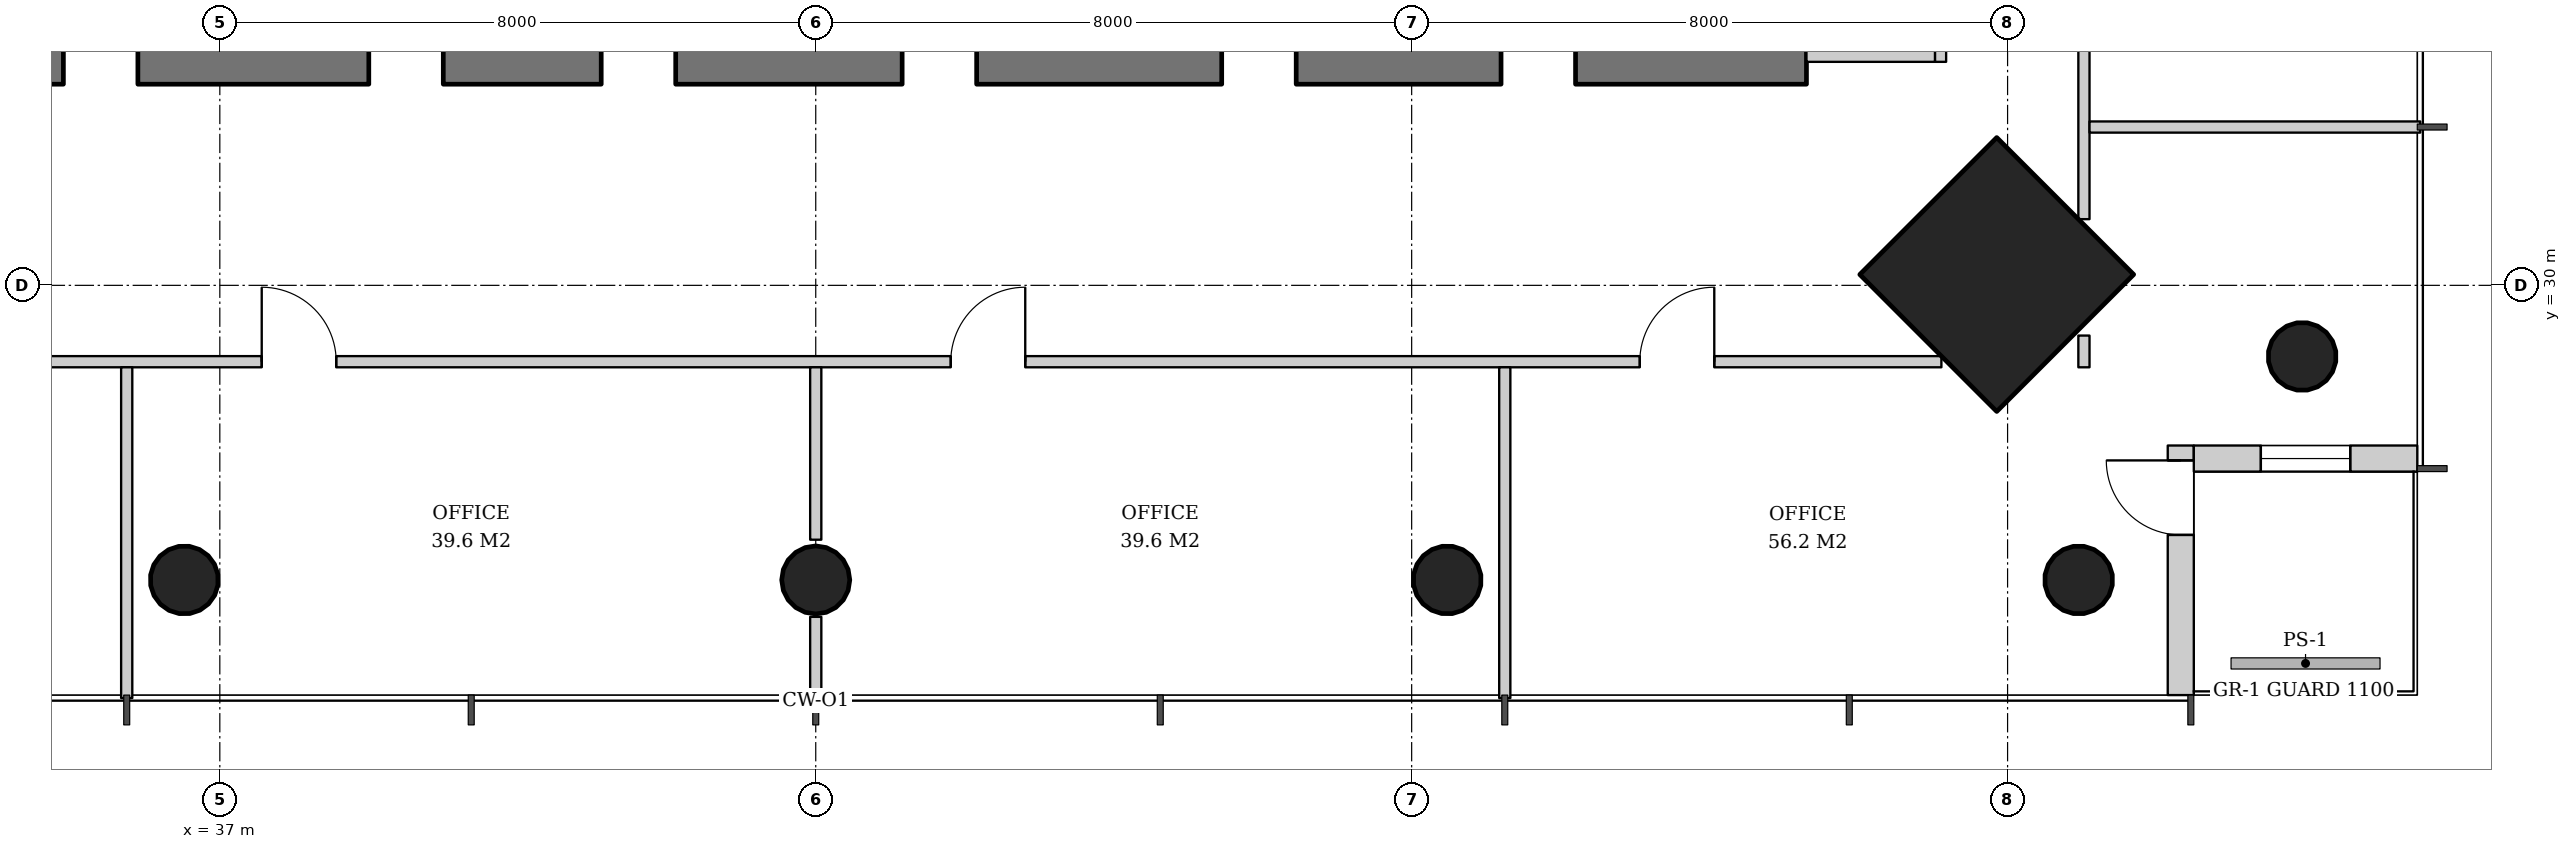
"""IFC4 building model, lengths in metres.
Left out: names, types, materials, properties, quantities, classifications, styles, units other than length and angle.
Written with IfcOpenShell. Run it as: python <this file> out.ifc"""

import sys

from ifc_helpers import new_model, si_unit, direction, frame, frame_2d, origin, origin_2d, place, context, subcontext, project, spatial, rectangle, hollow_circle, extrude, element, fill, save


model = new_model("IFC4")
c1 = context("Model", 3, precision=1e-05, world=origin(), true_north=direction((0.0, 1.0)))
c2 = subcontext(c1, "Body", "Model", "MODEL_VIEW")
j1 = project(units=[si_unit("LENGTHUNIT", "METRE"), si_unit("PLANEANGLEUNIT", "RADIAN")], contexts=[c1])
p1 = place(None, origin())
s1 = spatial("IfcSite", under=j1, at=p1, CompositionType="ELEMENT")
p2 = place(p1, origin())
s2 = spatial("IfcBuilding", under=s1, at=p2, CompositionType="ELEMENT")
p3 = place(p2, frame((0.0, 0.0, 146.4)))
s3 = spatial("IfcBuildingStorey", under=s2, at=p3, CompositionType="ELEMENT", Elevation=146.4)
p4 = place(p3, frame((64.993, 29.007, 0.0), z_axis=(-0.031962158256, 0.031962158256, 0.998977898093), x_axis=(-0.707106781187, -0.707106781187, 0.0)))
e1 = element("IfcColumn", 1, at=p4, inside=s3, PredefinedType="COLUMN", context=c2, shape_type="SweptSolid", body=[
    extrude(hollow_circle(Radius=0.457, WallThickness=0.03, at=origin_2d()), origin(), (0.0, 0.0, 1.0), 3.804),
])
p5 = place(p3, frame((60.893, 30.107, 0.0), z_axis=(-0.031898107953, 0.031898107953, 0.998981992539), x_axis=(-0.707106781187, -0.707106781187, 0.0)))
e2 = element("IfcColumn", 2, at=p5, inside=s3, PredefinedType="COLUMN", context=c2, shape_type="SweptSolid", body=[
    extrude(rectangle(XDim=2.6, YDim=2.6, at=origin_2d()), origin(), (0.0, 0.0, 1.0), 3.804),
])
p6 = place(p3, frame((61.993, 26.007, 0.0), z_axis=(-0.031962158256, 0.031962158256, 0.998977898093), x_axis=(-0.707106781187, -0.707106781187, 0.0)))
e3 = element("IfcColumn", 3, at=p6, inside=s3, PredefinedType="COLUMN", context=c2, shape_type="SweptSolid", body=[
    extrude(hollow_circle(Radius=0.457, WallThickness=0.03, at=origin_2d()), origin(), (0.0, 0.0, 1.0), 3.804),
])
p7 = place(p3, frame((36.504, 26.007, 0.0), z_axis=(0.015923015547, 0.031974442509, 0.999361842679), x_axis=(-0.895145027055, 0.445775033553, 0.0)))
e4 = element("IfcColumn", 4, at=p7, inside=s3, PredefinedType="COLUMN", context=c2, shape_type="SweptSolid", body=[
    extrude(hollow_circle(Radius=0.457, WallThickness=0.03, at=origin_2d()), origin(), (0.0, 0.0, 1.0), 3.802),
])
p8 = place(p3, frame((45.0, 26.007, 0.0), z_axis=(0.0, 0.031978496719, 0.999488557087), x_axis=(-1.0, 0.0, 0.0)))
e5 = element("IfcColumn", 5, at=p8, inside=s3, PredefinedType="COLUMN", context=c2, shape_type="SweptSolid", body=[
    extrude(hollow_circle(Radius=0.457, WallThickness=0.03, at=origin_2d()), origin(), (0.0, 0.0, 1.0), 3.802),
])
p9 = place(p3, frame((53.496, 26.007, 0.0), z_axis=(-0.015923015547, 0.031974442509, 0.999361842679), x_axis=(-0.895145027055, -0.445775033553, 0.0)))
e6 = element("IfcColumn", 6, at=p9, inside=s3, PredefinedType="COLUMN", context=c2, shape_type="SweptSolid", body=[
    extrude(hollow_circle(Radius=0.457, WallThickness=0.03, at=origin_2d()), origin(), (0.0, 0.0, 1.0), 3.802),
])
p10 = place(p3, frame((31.7, 33.05, 0.0), z_axis=(0.0, 0.0, 1.0), x_axis=(1.0, 0.0, 0.0)))
e7 = element("IfcWall", 7, at=p10, inside=s3, PredefinedType="SHEAR", context=c2, shape_type="SweptSolid", body=[
    extrude(rectangle(XDim=26.6, YDim=0.7, at=frame_2d((13.3, 0.0))), origin(), (0.0, 0.0, 1.0), 3.8),
])
p11 = place(p10, frame((7.3, 0.0, 0.0)))
e8 = element("IfcOpeningElement", 8, at=p11, cuts=e7, PredefinedType="OPENING", context=c2, shape_type="SweptSolid", body=[
    extrude(rectangle(XDim=1.0, YDim=2.1, at=frame_2d((0.5, 1.05))), frame((0.0, 0.36, 0.0), z_axis=(0.0, -1.0, 0.0), x_axis=(1.0, 0.0, 0.0)), (0.0, 0.0, 1.0), 0.72),
])
p12 = place(p10, frame((18.75, 0.0, 0.0)))
e9 = element("IfcOpeningElement", 9, at=p12, cuts=e7, PredefinedType="OPENING", context=c2, shape_type="SweptSolid", body=[
    extrude(rectangle(XDim=1.0, YDim=2.1, at=frame_2d((0.5, 1.05))), frame((0.0, 0.36, 0.0), z_axis=(0.0, -1.0, 0.0), x_axis=(1.0, 0.0, 0.0)), (0.0, 0.0, 1.0), 0.72),
])
p13 = place(p10, frame((3.2, 0.0, 0.0)))
e10 = element("IfcOpeningElement", 10, at=p13, cuts=e7, PredefinedType="OPENING", context=c2, shape_type="SweptSolid", body=[
    extrude(rectangle(XDim=1.0, YDim=2.1, at=frame_2d((0.5, 1.05))), frame((0.0, 0.36, 0.0), z_axis=(0.0, -1.0, 0.0), x_axis=(1.0, 0.0, 0.0)), (0.0, 0.0, 1.0), 0.72),
])
p14 = place(p10, frame((10.42, 0.0, 0.0)))
e11 = element("IfcOpeningElement", 11, at=p14, cuts=e7, PredefinedType="OPENING", context=c2, shape_type="SweptSolid", body=[
    extrude(rectangle(XDim=1.0, YDim=2.1, at=frame_2d((0.5, 1.05))), frame((0.0, 0.36, 0.0), z_axis=(0.0, -1.0, 0.0), x_axis=(1.0, 0.0, 0.0)), (0.0, 0.0, 1.0), 0.72),
])
p15 = place(p10, frame((14.46, 0.0, 0.0)))
e12 = element("IfcOpeningElement", 12, at=p15, cuts=e7, PredefinedType="OPENING", context=c2, shape_type="SweptSolid", body=[
    extrude(rectangle(XDim=1.0, YDim=2.1, at=frame_2d((0.5, 1.05))), frame((0.0, 0.36, 0.0), z_axis=(0.0, -1.0, 0.0), x_axis=(1.0, 0.0, 0.0)), (0.0, 0.0, 1.0), 0.72),
])
p16 = place(p10, frame((22.5, 0.0, 0.0)))
e13 = element("IfcOpeningElement", 13, at=p16, cuts=e7, PredefinedType="OPENING", context=c2, shape_type="SweptSolid", body=[
    extrude(rectangle(XDim=1.0, YDim=2.1, at=frame_2d((0.5, 1.05))), frame((0.0, 0.36, 0.0), z_axis=(0.0, -1.0, 0.0), x_axis=(1.0, 0.0, 0.0)), (0.0, 0.0, 1.0), 0.72),
])
p17 = place(p3, frame((63.325, 24.5, 0.0), z_axis=(0.0, 0.0, 1.0), x_axis=(0.0, 1.0, 0.0)))
e14 = element("IfcWall", 14, at=p17, inside=s3, PredefinedType="SOLIDWALL", context=c2, shape_type="SweptSolid", body=[
    extrude(rectangle(XDim=3.35, YDim=0.35, at=frame_2d((1.675, 0.0))), origin(), (0.0, 0.0, 1.0), 3.62),
])
p18 = place(p17, frame((2.15, 0.0, 0.0)))
e15 = element("IfcOpeningElement", 15, at=p18, cuts=e14, PredefinedType="OPENING", context=c2, shape_type="SweptSolid", body=[
    extrude(rectangle(XDim=1.0, YDim=2.4, at=frame_2d((0.5, 1.2))), frame((0.0, 0.185, 0.0), z_axis=(0.0, -1.0, 0.0), x_axis=(1.0, 0.0, 0.0)), (0.0, 0.0, 1.0), 0.37),
])
p19 = place(p3, frame((63.5, 27.675, 0.0), z_axis=(0.0, 0.0, 1.0), x_axis=(1.0, 0.0, 0.0)))
e16 = element("IfcWall", 16, at=p19, inside=s3, PredefinedType="SOLIDWALL", context=c2, shape_type="SweptSolid", body=[
    extrude(rectangle(XDim=3.0, YDim=0.35, at=frame_2d((1.5, 0.0))), origin(), (0.0, 0.0, 1.0), 3.62),
])
p20 = place(p19, frame((0.9, 0.0, 0.6)))
e17 = element("IfcOpeningElement", 17, at=p20, cuts=e16, PredefinedType="OPENING", context=c2, shape_type="SweptSolid", body=[
    extrude(rectangle(XDim=1.2, YDim=2.55, at=frame_2d((0.6, 1.275))), frame((0.0, 0.185, 0.0), z_axis=(0.0, -1.0, 0.0), x_axis=(1.0, 0.0, 0.0)), (0.0, 0.0, 1.0), 0.37),
])
p21 = place(p3, frame((60.1, 33.0, 0.0), z_axis=(0.0, 0.0, 1.0), x_axis=(0.0, 1.0, 0.0)))
e18 = element("IfcWall", 18, at=p21, inside=s3, PredefinedType="PARTITIONING", context=c2, shape_type="SweptSolid", body=[
    extrude(rectangle(XDim=10.975, YDim=0.15, at=frame_2d((5.488, 0.0))), origin(), (0.0, 0.0, 1.0), 2.72),
])
p22 = place(p21, frame((4.988, 0.0, 0.0)))
e19 = element("IfcOpeningElement", 19, at=p22, cuts=e18, PredefinedType="OPENING", context=c2, shape_type="SweptSolid", body=[
    extrude(rectangle(XDim=1.0, YDim=2.1, at=frame_2d((0.5, 1.05))), frame((0.0, 0.085, 0.0), z_axis=(0.0, -1.0, 0.0), x_axis=(1.0, 0.0, 0.0)), (0.0, 0.0, 1.0), 0.17),
])
p23 = place(p3, frame((58.3, 33.075, 0.0), z_axis=(0.0, 0.0, 1.0), x_axis=(1.0, 0.0, 0.0)))
e20 = element("IfcWall", 20, at=p23, inside=s3, PredefinedType="PARTITIONING", context=c2, shape_type="SweptSolid", body=[
    extrude(rectangle(XDim=1.725, YDim=0.15, at=frame_2d((0.862, 0.0))), origin(), (0.0, 0.0, 1.0), 2.72),
])
p24 = place(p3, frame((62.025, 28.9, 0.0), z_axis=(0.0, 0.0, 1.0), x_axis=(0.0, 1.0, 0.0)))
e21 = element("IfcWall", 21, at=p24, inside=s3, PredefinedType="PARTITIONING", context=c2, shape_type="SweptSolid", body=[
    extrude(rectangle(XDim=0.426, YDim=0.15, at=frame_2d((0.213, 0.0))), origin(), (0.0, 0.0, 1.0), 3.32),
])
p25 = place(p3, frame((62.025, 30.888, 0.0), z_axis=(0.0, 0.0, 1.0), x_axis=(0.0, 1.0, 0.0)))
e22 = element("IfcWall", 22, at=p25, inside=s3, PredefinedType="PARTITIONING", context=c2, shape_type="SweptSolid", body=[
    extrude(rectangle(XDim=30.223, YDim=0.15, at=frame_2d((15.112, 0.0))), origin(), (0.0, 0.0, 1.0), 2.72),
])
p26 = place(p25, frame((3.049, 0.0, 0.0)))
e23 = element("IfcOpeningElement", 23, at=p26, cuts=e22, PredefinedType="OPENING", context=c2, shape_type="SweptSolid", body=[
    extrude(rectangle(XDim=1.0, YDim=2.1, at=frame_2d((0.5, 1.05))), frame((0.0, 0.085, 0.0), z_axis=(0.0, -1.0, 0.0), x_axis=(1.0, 0.0, 0.0)), (0.0, 0.0, 1.0), 0.17),
])
p27 = place(p25, frame((7.674, 0.0, 0.0)))
e24 = element("IfcOpeningElement", 24, at=p27, cuts=e22, PredefinedType="OPENING", context=c2, shape_type="SweptSolid", body=[
    extrude(rectangle(XDim=1.0, YDim=2.1, at=frame_2d((0.5, 1.05))), frame((0.0, 0.085, 0.0), z_axis=(0.0, -1.0, 0.0), x_axis=(1.0, 0.0, 0.0)), (0.0, 0.0, 1.0), 0.17),
])
p28 = place(p25, frame((12.299, 0.0, 0.0)))
e25 = element("IfcOpeningElement", 25, at=p28, cuts=e22, PredefinedType="OPENING", context=c2, shape_type="SweptSolid", body=[
    extrude(rectangle(XDim=1.0, YDim=2.1, at=frame_2d((0.5, 1.05))), frame((0.0, 0.085, 0.0), z_axis=(0.0, -1.0, 0.0), x_axis=(1.0, 0.0, 0.0)), (0.0, 0.0, 1.0), 0.17),
])
p29 = place(p25, frame((16.924, 0.0, 0.0)))
e26 = element("IfcOpeningElement", 26, at=p29, cuts=e22, PredefinedType="OPENING", context=c2, shape_type="SweptSolid", body=[
    extrude(rectangle(XDim=1.0, YDim=2.1, at=frame_2d((0.5, 1.05))), frame((0.0, 0.085, 0.0), z_axis=(0.0, -1.0, 0.0), x_axis=(1.0, 0.0, 0.0)), (0.0, 0.0, 1.0), 0.17),
])
p30 = place(p25, frame((21.549, 0.0, 0.0)))
e27 = element("IfcOpeningElement", 27, at=p30, cuts=e22, PredefinedType="OPENING", context=c2, shape_type="SweptSolid", body=[
    extrude(rectangle(XDim=1.0, YDim=2.1, at=frame_2d((0.5, 1.05))), frame((0.0, 0.085, 0.0), z_axis=(0.0, -1.0, 0.0), x_axis=(1.0, 0.0, 0.0)), (0.0, 0.0, 1.0), 0.17),
])
p31 = place(p3, frame((62.1, 32.125, 0.0), z_axis=(0.0, 0.0, 1.0), x_axis=(1.0, 0.0, 0.0)))
e28 = element("IfcWall", 28, at=p31, inside=s3, PredefinedType="PARTITIONING", context=c2, shape_type="SweptSolid", body=[
    extrude(rectangle(XDim=4.44, YDim=0.15, at=frame_2d((2.22, 0.0))), origin(), (0.0, 0.0, 1.0), 2.82),
])
p32 = place(p3, frame((29.888, 28.975, 0.0), z_axis=(0.0, 0.0, 1.0), x_axis=(1.0, 0.0, 0.0)))
e29 = element("IfcWall", 29, at=p32, inside=s3, PredefinedType="PARTITIONING", context=c2, shape_type="SweptSolid", body=[
    extrude(rectangle(XDim=30.223, YDim=0.15, at=frame_2d((15.112, 0.0))), origin(), (0.0, 0.0, 1.0), 2.72),
])
p33 = place(p32, frame((3.049, 0.0, 0.0)))
e30 = element("IfcOpeningElement", 30, at=p33, cuts=e29, PredefinedType="OPENING", context=c2, shape_type="SweptSolid", body=[
    extrude(rectangle(XDim=1.0, YDim=2.1, at=frame_2d((0.5, 1.05))), frame((0.0, 0.085, 0.0), z_axis=(0.0, -1.0, 0.0), x_axis=(1.0, 0.0, 0.0)), (0.0, 0.0, 1.0), 0.17),
])
p34 = place(p32, frame((7.674, 0.0, 0.0)))
e31 = element("IfcOpeningElement", 31, at=p34, cuts=e29, PredefinedType="OPENING", context=c2, shape_type="SweptSolid", body=[
    extrude(rectangle(XDim=1.0, YDim=2.1, at=frame_2d((0.5, 1.05))), frame((0.0, 0.085, 0.0), z_axis=(0.0, -1.0, 0.0), x_axis=(1.0, 0.0, 0.0)), (0.0, 0.0, 1.0), 0.17),
])
p35 = place(p32, frame((16.924, 0.0, 0.0)))
e32 = element("IfcOpeningElement", 32, at=p35, cuts=e29, PredefinedType="OPENING", context=c2, shape_type="SweptSolid", body=[
    extrude(rectangle(XDim=1.0, YDim=2.1, at=frame_2d((0.5, 1.05))), frame((0.0, 0.085, 0.0), z_axis=(0.0, -1.0, 0.0), x_axis=(1.0, 0.0, 0.0)), (0.0, 0.0, 1.0), 0.17),
])
p36 = place(p32, frame((26.174, 0.0, 0.0)))
e33 = element("IfcOpeningElement", 33, at=p36, cuts=e29, PredefinedType="OPENING", context=c2, shape_type="SweptSolid", body=[
    extrude(rectangle(XDim=1.0, YDim=2.1, at=frame_2d((0.5, 1.05))), frame((0.0, 0.085, 0.0), z_axis=(0.0, -1.0, 0.0), x_axis=(1.0, 0.0, 0.0)), (0.0, 0.0, 1.0), 0.17),
])
p37 = place(p3, frame((35.75, 28.9, 0.0), z_axis=(0.0, 0.0, 1.0), x_axis=(0.0, -1.0, 0.0)))
e34 = element("IfcWall", 34, at=p37, inside=s3, PredefinedType="PARTITIONING", context=c2, shape_type="SweptSolid", body=[
    extrude(rectangle(XDim=4.44, YDim=0.15, at=frame_2d((2.22, 0.0))), origin(), (0.0, 0.0, 1.0), 2.82),
])
p38 = place(p3, frame((45.0, 28.9, 0.0), z_axis=(0.0, 0.0, 1.0), x_axis=(0.0, -1.0, 0.0)))
e35 = element("IfcWall", 35, at=p38, inside=s3, PredefinedType="PARTITIONING", context=c2, shape_type="SweptSolid", body=[
    extrude(rectangle(XDim=2.314, YDim=0.15, at=frame_2d((1.157, 0.0))), origin(), (0.0, 0.0, 1.0), 3.62),
])
p39 = place(p3, frame((45.0, 25.55, 0.0), z_axis=(0.0, 0.0, 1.0), x_axis=(0.0, -1.0, 0.0)))
e36 = element("IfcWall", 36, at=p39, inside=s3, PredefinedType="PARTITIONING", context=c2, shape_type="SweptSolid", body=[
    extrude(rectangle(XDim=1.09, YDim=0.15, at=frame_2d((0.545, 0.0))), origin(), (0.0, 0.0, 1.0), 3.62),
])
p40 = place(p3, frame((54.25, 28.9, 0.0), z_axis=(0.0, 0.0, 1.0), x_axis=(0.0, -1.0, 0.0)))
e37 = element("IfcWall", 37, at=p40, inside=s3, PredefinedType="PARTITIONING", context=c2, shape_type="SweptSolid", body=[
    extrude(rectangle(XDim=4.44, YDim=0.15, at=frame_2d((2.22, 0.0))), origin(), (0.0, 0.0, 1.0), 2.82),
])
p41 = place(p18, origin())
e38 = element("IfcDoor", 38, at=p41, inside=s3, OperationType="SINGLE_SWING_RIGHT", PredefinedType="DOOR", context=c2, shape_type="SweptSolid", body=[
    extrude(rectangle(XDim=1.0, YDim=2.4, at=frame_2d((0.5, 1.2))), frame((0.0, 0.025, 0.0), z_axis=(0.0, -1.0, 0.0), x_axis=(1.0, 0.0, 0.0)), (0.0, 0.0, 1.0), 0.05),
])
fill(e15, e38)
p42 = place(p20, origin())
e39 = element("IfcWindow", 39, at=p42, inside=s3, PartitioningType="SINGLE_PANEL", PredefinedType="WINDOW", context=c2, shape_type="SweptSolid", body=[
    extrude(rectangle(XDim=1.2, YDim=2.55, at=frame_2d((0.6, 1.275))), frame((0.0, 0.03, 0.0), z_axis=(0.0, -1.0, 0.0), x_axis=(1.0, 0.0, 0.0)), (0.0, 0.0, 1.0), 0.06),
])
fill(e17, e39)
p43 = place(p11, origin())
e40 = element("IfcDoor", 40, at=p43, inside=s3, OperationType="SINGLE_SWING_LEFT", PredefinedType="DOOR", context=c2, shape_type="SweptSolid", body=[
    extrude(rectangle(XDim=1.0, YDim=2.1, at=frame_2d((0.5, 1.05))), frame((0.0, 0.025, 0.0), z_axis=(0.0, -1.0, 0.0), x_axis=(1.0, 0.0, 0.0)), (0.0, 0.0, 1.0), 0.05),
])
fill(e8, e40)
p44 = place(p12, origin())
e41 = element("IfcDoor", 41, at=p44, inside=s3, OperationType="SINGLE_SWING_RIGHT", PredefinedType="DOOR", context=c2, shape_type="SweptSolid", body=[
    extrude(rectangle(XDim=1.0, YDim=2.1, at=frame_2d((0.5, 1.05))), frame((0.0, 0.025, 0.0), z_axis=(0.0, -1.0, 0.0), x_axis=(1.0, 0.0, 0.0)), (0.0, 0.0, 1.0), 0.05),
])
fill(e9, e41)
p45 = place(p34, origin())
e42 = element("IfcDoor", 42, at=p45, inside=s3, OperationType="SINGLE_SWING_LEFT", PredefinedType="DOOR", context=c2, shape_type="SweptSolid", body=[
    extrude(rectangle(XDim=1.0, YDim=2.1, at=frame_2d((0.5, 1.05))), frame((0.0, 0.025, 0.0), z_axis=(0.0, -1.0, 0.0), x_axis=(1.0, 0.0, 0.0)), (0.0, 0.0, 1.0), 0.05),
])
fill(e31, e42)
p46 = place(p35, origin())
e43 = element("IfcDoor", 43, at=p46, inside=s3, OperationType="SINGLE_SWING_RIGHT", PredefinedType="DOOR", context=c2, shape_type="SweptSolid", body=[
    extrude(rectangle(XDim=1.0, YDim=2.1, at=frame_2d((0.5, 1.05))), frame((0.0, 0.025, 0.0), z_axis=(0.0, -1.0, 0.0), x_axis=(1.0, 0.0, 0.0)), (0.0, 0.0, 1.0), 0.05),
])
fill(e32, e43)
p47 = place(p36, origin())
e44 = element("IfcDoor", 44, at=p47, inside=s3, OperationType="SINGLE_SWING_RIGHT", PredefinedType="DOOR", context=c2, shape_type="SweptSolid", body=[
    extrude(rectangle(XDim=1.0, YDim=2.1, at=frame_2d((0.5, 1.05))), frame((0.0, 0.025, 0.0), z_axis=(0.0, -1.0, 0.0), x_axis=(1.0, 0.0, 0.0)), (0.0, 0.0, 1.0), 0.05),
])
fill(e33, e44)
save(model, sys.argv[1])
